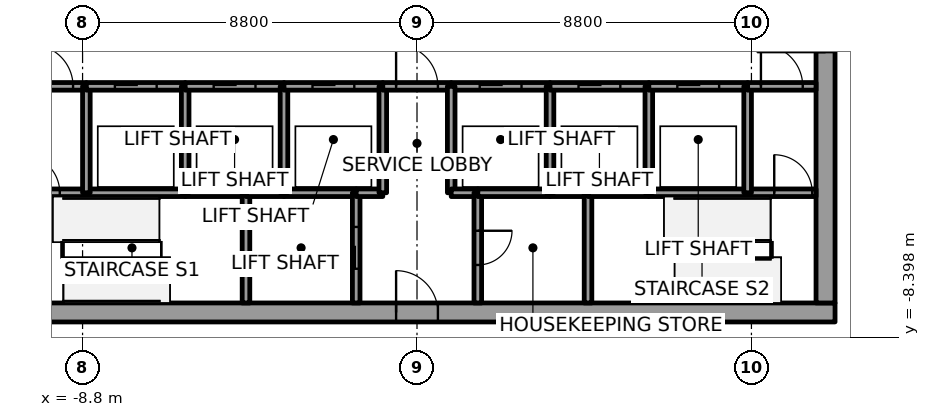
"""IFC4 building model, lengths in metres.
Left out: names, types, materials, properties, quantities, classifications, styles, units other than length and angle.
Written with IfcOpenShell. Run it as: python <this file> out.ifc"""

import sys

from ifc_helpers import new_model, si_unit, direction, frame, frame_2d, origin, place, context, subcontext, project, spatial, rectangle, extrude, element, fill, save


model = new_model("IFC4")
c1 = context("Model", 3, precision=1e-05, world=origin(), true_north=direction((0.0, 1.0)))
c2 = subcontext(c1, "Body", "Model", "MODEL_VIEW")
j1 = project(units=[si_unit("LENGTHUNIT", "METRE"), si_unit("PLANEANGLEUNIT", "RADIAN")], contexts=[c1])
p1 = place(None, origin())
s1 = spatial("IfcSite", under=j1, at=p1, CompositionType="ELEMENT")
p2 = place(p1, origin())
s2 = spatial("IfcBuilding", under=s1, at=p2, CompositionType="ELEMENT")
p3 = place(p2, frame((0.0, 0.0, 40.8)))
s3 = spatial("IfcBuildingStorey", under=s2, at=p3, CompositionType="ELEMENT", Elevation=40.8)
p4 = place(p3, frame((-11.0, -7.75, 0.0), z_axis=(0.0, 0.0, 1.0), x_axis=(1.0, 0.0, 0.0)))
e1 = element("IfcWall", 1, at=p4, inside=s3, PredefinedType="SHEAR", context=c2, shape_type="SweptSolid", body=[
    extrude(rectangle(XDim=22.0, YDim=0.5, at=frame_2d((11.0, 0.0))), origin(), (0.0, 0.0, 1.0), 7.2),
])
p5 = place(p4, frame((10.45, 0.0, 0.0)))
e2 = element("IfcOpeningElement", 2, at=p5, cuts=e1, PredefinedType="OPENING", context=c2, shape_type="SweptSolid", body=[
    extrude(rectangle(XDim=1.1, YDim=2.1, at=frame_2d((0.55, 1.05))), frame((0.0, 0.25, 0.0), z_axis=(0.0, -1.0, 0.0), x_axis=(1.0, 0.0, 0.0)), (0.0, 0.0, 1.0), 0.5),
])
p6 = place(p3, frame((10.75, -7.5, 0.0), z_axis=(0.0, 0.0, 1.0), x_axis=(0.0, 1.0, 0.0)))
e3 = element("IfcWall", 3, at=p6, inside=s3, PredefinedType="SHEAR", context=c2, shape_type="SweptSolid", body=[
    extrude(rectangle(XDim=15.0, YDim=0.5, at=frame_2d((7.5, 0.0))), origin(), (0.0, 0.0, 1.0), 7.2),
])
p7 = place(p6, frame((6.6, 0.0, 0.0)))
e4 = element("IfcOpeningElement", 4, at=p7, cuts=e3, PredefinedType="OPENING", context=c2, shape_type="SweptSolid", body=[
    extrude(rectangle(XDim=1.8, YDim=2.1, at=frame_2d((0.9, 1.05))), frame((0.0, 0.25, 0.0), z_axis=(0.0, -1.0, 0.0), x_axis=(1.0, 0.0, 0.0)), (0.0, 0.0, 1.0), 0.5),
])
p8 = place(p3, frame((-10.5, -4.6, 0.0), z_axis=(0.0, 0.0, 1.0), x_axis=(1.0, 0.0, 0.0)))
e5 = element("IfcWall", 5, at=p8, inside=s3, PredefinedType="SOLIDWALL", context=c2, shape_type="SweptSolid", body=[
    extrude(rectangle(XDim=1.8, YDim=0.2, at=frame_2d((0.9, 0.0))), origin(), (0.0, 0.0, 1.0), 7.05),
])
p9 = place(p8, frame((0.1, 0.0, 0.0)))
e6 = element("IfcOpeningElement", 6, at=p9, cuts=e5, PredefinedType="OPENING", context=c2, shape_type="SweptSolid", body=[
    extrude(rectangle(XDim=1.0, YDim=2.1, at=frame_2d((0.5, 1.05))), frame((0.0, 0.1, 0.0), z_axis=(0.0, -1.0, 0.0), x_axis=(1.0, 0.0, 0.0)), (0.0, 0.0, 1.0), 0.2),
])
p10 = place(p3, frame((-10.5, -1.8, 0.0), z_axis=(0.0, 0.0, 1.0), x_axis=(1.0, 0.0, 0.0)))
e7 = element("IfcWall", 7, at=p10, inside=s3, PredefinedType="SOLIDWALL", context=c2, shape_type="SweptSolid", body=[
    extrude(rectangle(XDim=1.8, YDim=0.2, at=frame_2d((0.9, 0.0))), origin(), (0.0, 0.0, 1.0), 7.05),
])
p11 = place(p10, frame((0.35, 0.0, 0.0)))
e8 = element("IfcOpeningElement", 8, at=p11, cuts=e7, PredefinedType="OPENING", context=c2, shape_type="SweptSolid", body=[
    extrude(rectangle(XDim=1.1, YDim=2.1, at=frame_2d((0.55, 1.05))), frame((0.0, 0.1, 0.0), z_axis=(0.0, -1.0, 0.0), x_axis=(1.0, 0.0, 0.0)), (0.0, 0.0, 1.0), 0.2),
])
p12 = place(p3, frame((-8.7, -4.6, 0.0), z_axis=(0.0, 0.0, 1.0), x_axis=(1.0, 0.0, 0.0)))
e9 = element("IfcWall", 9, at=p12, inside=s3, PredefinedType="SOLIDWALL", context=c2, shape_type="SweptSolid", body=[
    extrude(rectangle(XDim=2.6, YDim=0.2, at=frame_2d((1.3, 0.0))), origin(), (0.0, 0.0, 1.0), 7.05),
])
p13 = place(p3, frame((-8.7, -4.6, 0.0), z_axis=(0.0, 0.0, 1.0), x_axis=(0.0, 1.0, 0.0)))
e10 = element("IfcWall", 10, at=p13, inside=s3, PredefinedType="SOLIDWALL", context=c2, shape_type="SweptSolid", body=[
    extrude(rectangle(XDim=2.8, YDim=0.2, at=frame_2d((1.4, 0.0))), origin(), (0.0, 0.0, 1.0), 7.05),
])
p14 = place(p3, frame((-8.7, -1.8, 0.0), z_axis=(0.0, 0.0, 1.0), x_axis=(1.0, 0.0, 0.0)))
e11 = element("IfcWall", 11, at=p14, inside=s3, PredefinedType="SOLIDWALL", context=c2, shape_type="SweptSolid", body=[
    extrude(rectangle(XDim=2.6, YDim=0.2, at=frame_2d((1.3, 0.0))), origin(), (0.0, 0.0, 1.0), 7.05),
])
p15 = place(p14, frame((0.75, 0.0, 0.0)))
e12 = element("IfcOpeningElement", 12, at=p15, cuts=e11, PredefinedType="OPENING", context=c2, shape_type="SweptSolid", body=[
    extrude(rectangle(XDim=1.1, YDim=2.1, at=frame_2d((0.55, 1.05))), frame((0.0, 0.1, 0.0), z_axis=(0.0, -1.0, 0.0), x_axis=(1.0, 0.0, 0.0)), (0.0, 0.0, 1.0), 0.2),
])
p16 = place(p3, frame((-6.1, -4.6, 0.0), z_axis=(0.0, 0.0, 1.0), x_axis=(1.0, 0.0, 0.0)))
e13 = element("IfcWall", 13, at=p16, inside=s3, PredefinedType="SOLIDWALL", context=c2, shape_type="SweptSolid", body=[
    extrude(rectangle(XDim=1.6, YDim=0.2, at=frame_2d((0.8, 0.0))), origin(), (0.0, 0.0, 1.0), 7.05),
])
p17 = place(p3, frame((-6.1, -4.6, 0.0), z_axis=(0.0, 0.0, 1.0), x_axis=(0.0, 1.0, 0.0)))
e14 = element("IfcWall", 14, at=p17, inside=s3, PredefinedType="SOLIDWALL", context=c2, shape_type="SweptSolid", body=[
    extrude(rectangle(XDim=2.8, YDim=0.2, at=frame_2d((1.4, 0.0))), origin(), (0.0, 0.0, 1.0), 7.05),
])
p18 = place(p3, frame((-6.1, -1.8, 0.0), z_axis=(0.0, 0.0, 1.0), x_axis=(1.0, 0.0, 0.0)))
e15 = element("IfcWall", 15, at=p18, inside=s3, PredefinedType="SOLIDWALL", context=c2, shape_type="SweptSolid", body=[
    extrude(rectangle(XDim=2.6, YDim=0.2, at=frame_2d((1.3, 0.0))), origin(), (0.0, 0.0, 1.0), 7.05),
])
p19 = place(p18, frame((0.75, 0.0, 0.0)))
e16 = element("IfcOpeningElement", 16, at=p19, cuts=e15, PredefinedType="OPENING", context=c2, shape_type="SweptSolid", body=[
    extrude(rectangle(XDim=1.1, YDim=2.1, at=frame_2d((0.55, 1.05))), frame((0.0, 0.1, 0.0), z_axis=(0.0, -1.0, 0.0), x_axis=(1.0, 0.0, 0.0)), (0.0, 0.0, 1.0), 0.2),
])
p20 = place(p3, frame((-4.5, -4.6, 0.0), z_axis=(0.0, 0.0, 1.0), x_axis=(0.0, -1.0, 0.0)))
e17 = element("IfcWall", 17, at=p20, inside=s3, PredefinedType="SOLIDWALL", context=c2, shape_type="SweptSolid", body=[
    extrude(rectangle(XDim=2.9, YDim=0.2, at=frame_2d((1.45, 0.0))), origin(), (0.0, 0.0, 1.0), 7.05),
])
p21 = place(p3, frame((-4.5, -4.6, 0.0), z_axis=(0.0, 0.0, 1.0), x_axis=(1.0, 0.0, 0.0)))
e18 = element("IfcWall", 18, at=p21, inside=s3, PredefinedType="SOLIDWALL", context=c2, shape_type="SweptSolid", body=[
    extrude(rectangle(XDim=1.0, YDim=0.2, at=frame_2d((0.5, 0.0))), origin(), (0.0, 0.0, 1.0), 7.05),
])
p22 = place(p3, frame((-3.5, -4.6, 0.0), z_axis=(0.0, 0.0, 1.0), x_axis=(1.0, 0.0, 0.0)))
e19 = element("IfcWall", 19, at=p22, inside=s3, PredefinedType="SOLIDWALL", context=c2, shape_type="SweptSolid", body=[
    extrude(rectangle(XDim=1.9, YDim=0.2, at=frame_2d((0.95, 0.0))), origin(), (0.0, 0.0, 1.0), 7.05),
])
p23 = place(p3, frame((-3.5, -4.6, 0.0), z_axis=(0.0, 0.0, 1.0), x_axis=(0.0, 1.0, 0.0)))
e20 = element("IfcWall", 20, at=p23, inside=s3, PredefinedType="SOLIDWALL", context=c2, shape_type="SweptSolid", body=[
    extrude(rectangle(XDim=2.8, YDim=0.2, at=frame_2d((1.4, 0.0))), origin(), (0.0, 0.0, 1.0), 7.05),
])
p24 = place(p3, frame((-3.5, -1.8, 0.0), z_axis=(0.0, 0.0, 1.0), x_axis=(1.0, 0.0, 0.0)))
e21 = element("IfcWall", 21, at=p24, inside=s3, PredefinedType="SOLIDWALL", context=c2, shape_type="SweptSolid", body=[
    extrude(rectangle(XDim=2.6, YDim=0.2, at=frame_2d((1.3, 0.0))), origin(), (0.0, 0.0, 1.0), 7.05),
])
p25 = place(p24, frame((0.75, 0.0, 0.0)))
e22 = element("IfcOpeningElement", 22, at=p25, cuts=e21, PredefinedType="OPENING", context=c2, shape_type="SweptSolid", body=[
    extrude(rectangle(XDim=1.1, YDim=2.1, at=frame_2d((0.55, 1.05))), frame((0.0, 0.1, 0.0), z_axis=(0.0, -1.0, 0.0), x_axis=(1.0, 0.0, 0.0)), (0.0, 0.0, 1.0), 0.2),
])
p26 = place(p3, frame((-1.6, -7.5, 0.0), z_axis=(0.0, 0.0, 1.0), x_axis=(0.0, 1.0, 0.0)))
e23 = element("IfcWall", 23, at=p26, inside=s3, PredefinedType="SOLIDWALL", context=c2, shape_type="SweptSolid", body=[
    extrude(rectangle(XDim=2.9, YDim=0.2, at=frame_2d((1.45, 0.0))), origin(), (0.0, 0.0, 1.0), 7.05),
])
p27 = place(p26, frame((0.9, 0.0, 0.0)))
e24 = element("IfcOpeningElement", 24, at=p27, cuts=e23, PredefinedType="OPENING", context=c2, shape_type="SweptSolid", body=[
    extrude(rectangle(XDim=1.1, YDim=2.1, at=frame_2d((0.55, 1.05))), frame((0.0, 0.1, 0.0), z_axis=(0.0, -1.0, 0.0), x_axis=(1.0, 0.0, 0.0)), (0.0, 0.0, 1.0), 0.2),
])
p28 = place(p3, frame((-1.6, -4.6, 0.0), z_axis=(0.0, 0.0, 1.0), x_axis=(1.0, 0.0, 0.0)))
e25 = element("IfcWall", 25, at=p28, inside=s3, PredefinedType="SOLIDWALL", context=c2, shape_type="SweptSolid", body=[
    extrude(rectangle(XDim=0.7, YDim=0.2, at=frame_2d((0.35, 0.0))), origin(), (0.0, 0.0, 1.0), 7.05),
])
p29 = place(p3, frame((-0.9, -4.6, 0.0), z_axis=(0.0, 0.0, 1.0), x_axis=(0.0, 1.0, 0.0)))
e26 = element("IfcWall", 26, at=p29, inside=s3, PredefinedType="SOLIDWALL", context=c2, shape_type="SweptSolid", body=[
    extrude(rectangle(XDim=2.8, YDim=0.2, at=frame_2d((1.4, 0.0))), origin(), (0.0, 0.0, 1.0), 7.05),
])
p30 = place(p3, frame((-0.9, -1.8, 0.0), z_axis=(0.0, 0.0, 1.0), x_axis=(1.0, 0.0, 0.0)))
e27 = element("IfcWall", 27, at=p30, inside=s3, PredefinedType="SOLIDWALL", context=c2, shape_type="SweptSolid", body=[
    extrude(rectangle(XDim=1.8, YDim=0.2, at=frame_2d((0.9, 0.0))), origin(), (0.0, 0.0, 1.0), 7.05),
])
p31 = place(p30, frame((0.35, 0.0, 0.0)))
e28 = element("IfcOpeningElement", 28, at=p31, cuts=e27, PredefinedType="OPENING", context=c2, shape_type="SweptSolid", body=[
    extrude(rectangle(XDim=1.1, YDim=2.1, at=frame_2d((0.55, 1.05))), frame((0.0, 0.1, 0.0), z_axis=(0.0, -1.0, 0.0), x_axis=(1.0, 0.0, 0.0)), (0.0, 0.0, 1.0), 0.2),
])
p32 = place(p3, frame((0.9, -1.8, 0.0), z_axis=(0.0, 0.0, 1.0), x_axis=(1.0, 0.0, 0.0)))
e29 = element("IfcWall", 29, at=p32, inside=s3, PredefinedType="SOLIDWALL", context=c2, shape_type="SweptSolid", body=[
    extrude(rectangle(XDim=2.6, YDim=0.2, at=frame_2d((1.3, 0.0))), origin(), (0.0, 0.0, 1.0), 7.05),
])
p33 = place(p32, frame((0.75, 0.0, 0.0)))
e30 = element("IfcOpeningElement", 30, at=p33, cuts=e29, PredefinedType="OPENING", context=c2, shape_type="SweptSolid", body=[
    extrude(rectangle(XDim=1.1, YDim=2.1, at=frame_2d((0.55, 1.05))), frame((0.0, 0.1, 0.0), z_axis=(0.0, -1.0, 0.0), x_axis=(1.0, 0.0, 0.0)), (0.0, 0.0, 1.0), 0.2),
])
p34 = place(p3, frame((0.9, -1.8, 0.0), z_axis=(0.0, 0.0, 1.0), x_axis=(0.0, -1.0, 0.0)))
e31 = element("IfcWall", 31, at=p34, inside=s3, PredefinedType="SOLIDWALL", context=c2, shape_type="SweptSolid", body=[
    extrude(rectangle(XDim=2.8, YDim=0.2, at=frame_2d((1.4, 0.0))), origin(), (0.0, 0.0, 1.0), 7.05),
])
p35 = place(p3, frame((0.9, -4.6, 0.0), z_axis=(0.0, 0.0, 1.0), x_axis=(1.0, 0.0, 0.0)))
e32 = element("IfcWall", 32, at=p35, inside=s3, PredefinedType="SOLIDWALL", context=c2, shape_type="SweptSolid", body=[
    extrude(rectangle(XDim=0.7, YDim=0.2, at=frame_2d((0.35, 0.0))), origin(), (0.0, 0.0, 1.0), 7.05),
])
p36 = place(p3, frame((1.6, -4.6, 0.0), z_axis=(0.0, 0.0, 1.0), x_axis=(0.0, -1.0, 0.0)))
e33 = element("IfcWall", 33, at=p36, inside=s3, PredefinedType="SOLIDWALL", context=c2, shape_type="SweptSolid", body=[
    extrude(rectangle(XDim=2.9, YDim=0.2, at=frame_2d((1.45, 0.0))), origin(), (0.0, 0.0, 1.0), 7.05),
])
p37 = place(p36, frame((1.0, 0.0, 0.0)))
e34 = element("IfcOpeningElement", 34, at=p37, cuts=e33, PredefinedType="OPENING", context=c2, shape_type="SweptSolid", body=[
    extrude(rectangle(XDim=0.9, YDim=2.1, at=frame_2d((0.45, 1.05))), frame((0.0, 0.1, 0.0), z_axis=(0.0, -1.0, 0.0), x_axis=(1.0, 0.0, 0.0)), (0.0, 0.0, 1.0), 0.2),
])
p38 = place(p3, frame((3.5, -4.6, 0.0), z_axis=(0.0, 0.0, 1.0), x_axis=(-1.0, 0.0, 0.0)))
e35 = element("IfcWall", 35, at=p38, inside=s3, PredefinedType="SOLIDWALL", context=c2, shape_type="SweptSolid", body=[
    extrude(rectangle(XDim=1.9, YDim=0.2, at=frame_2d((0.95, 0.0))), origin(), (0.0, 0.0, 1.0), 7.05),
])
p39 = place(p3, frame((4.5, -4.6, 0.0), z_axis=(0.0, 0.0, 1.0), x_axis=(-1.0, 0.0, 0.0)))
e36 = element("IfcWall", 36, at=p39, inside=s3, PredefinedType="SOLIDWALL", context=c2, shape_type="SweptSolid", body=[
    extrude(rectangle(XDim=1.0, YDim=0.2, at=frame_2d((0.5, 0.0))), origin(), (0.0, 0.0, 1.0), 7.05),
])
p40 = place(p3, frame((3.5, -4.6, 0.0), z_axis=(0.0, 0.0, 1.0), x_axis=(0.0, 1.0, 0.0)))
e37 = element("IfcWall", 37, at=p40, inside=s3, PredefinedType="SOLIDWALL", context=c2, shape_type="SweptSolid", body=[
    extrude(rectangle(XDim=2.8, YDim=0.2, at=frame_2d((1.4, 0.0))), origin(), (0.0, 0.0, 1.0), 7.05),
])
p41 = place(p3, frame((3.5, -1.8, 0.0), z_axis=(0.0, 0.0, 1.0), x_axis=(1.0, 0.0, 0.0)))
e38 = element("IfcWall", 38, at=p41, inside=s3, PredefinedType="SOLIDWALL", context=c2, shape_type="SweptSolid", body=[
    extrude(rectangle(XDim=2.6, YDim=0.2, at=frame_2d((1.3, 0.0))), origin(), (0.0, 0.0, 1.0), 7.05),
])
p42 = place(p41, frame((0.75, 0.0, 0.0)))
e39 = element("IfcOpeningElement", 39, at=p42, cuts=e38, PredefinedType="OPENING", context=c2, shape_type="SweptSolid", body=[
    extrude(rectangle(XDim=1.1, YDim=2.1, at=frame_2d((0.55, 1.05))), frame((0.0, 0.1, 0.0), z_axis=(0.0, -1.0, 0.0), x_axis=(1.0, 0.0, 0.0)), (0.0, 0.0, 1.0), 0.2),
])
p43 = place(p3, frame((4.5, -7.5, 0.0), z_axis=(0.0, 0.0, 1.0), x_axis=(0.0, 1.0, 0.0)))
e40 = element("IfcWall", 40, at=p43, inside=s3, PredefinedType="SOLIDWALL", context=c2, shape_type="SweptSolid", body=[
    extrude(rectangle(XDim=2.9, YDim=0.2, at=frame_2d((1.45, 0.0))), origin(), (0.0, 0.0, 1.0), 7.05),
])
p44 = place(p3, frame((4.5, -4.6, 0.0), z_axis=(0.0, 0.0, 1.0), x_axis=(1.0, 0.0, 0.0)))
e41 = element("IfcWall", 41, at=p44, inside=s3, PredefinedType="SOLIDWALL", context=c2, shape_type="SweptSolid", body=[
    extrude(rectangle(XDim=1.6, YDim=0.2, at=frame_2d((0.8, 0.0))), origin(), (0.0, 0.0, 1.0), 7.05),
])
p45 = place(p3, frame((6.1, -4.6, 0.0), z_axis=(0.0, 0.0, 1.0), x_axis=(1.0, 0.0, 0.0)))
e42 = element("IfcWall", 42, at=p45, inside=s3, PredefinedType="SOLIDWALL", context=c2, shape_type="SweptSolid", body=[
    extrude(rectangle(XDim=2.6, YDim=0.2, at=frame_2d((1.3, 0.0))), origin(), (0.0, 0.0, 1.0), 7.05),
])
p46 = place(p3, frame((6.1, -4.6, 0.0), z_axis=(0.0, 0.0, 1.0), x_axis=(0.0, 1.0, 0.0)))
e43 = element("IfcWall", 43, at=p46, inside=s3, PredefinedType="SOLIDWALL", context=c2, shape_type="SweptSolid", body=[
    extrude(rectangle(XDim=2.8, YDim=0.2, at=frame_2d((1.4, 0.0))), origin(), (0.0, 0.0, 1.0), 7.05),
])
p47 = place(p3, frame((6.1, -1.8, 0.0), z_axis=(0.0, 0.0, 1.0), x_axis=(1.0, 0.0, 0.0)))
e44 = element("IfcWall", 44, at=p47, inside=s3, PredefinedType="SOLIDWALL", context=c2, shape_type="SweptSolid", body=[
    extrude(rectangle(XDim=2.6, YDim=0.2, at=frame_2d((1.3, 0.0))), origin(), (0.0, 0.0, 1.0), 7.05),
])
p48 = place(p47, frame((0.75, 0.0, 0.0)))
e45 = element("IfcOpeningElement", 45, at=p48, cuts=e44, PredefinedType="OPENING", context=c2, shape_type="SweptSolid", body=[
    extrude(rectangle(XDim=1.1, YDim=2.1, at=frame_2d((0.55, 1.05))), frame((0.0, 0.1, 0.0), z_axis=(0.0, -1.0, 0.0), x_axis=(1.0, 0.0, 0.0)), (0.0, 0.0, 1.0), 0.2),
])
p49 = place(p3, frame((8.7, -4.6, 0.0), z_axis=(0.0, 0.0, 1.0), x_axis=(1.0, 0.0, 0.0)))
e46 = element("IfcWall", 46, at=p49, inside=s3, PredefinedType="SOLIDWALL", context=c2, shape_type="SweptSolid", body=[
    extrude(rectangle(XDim=1.8, YDim=0.2, at=frame_2d((0.9, 0.0))), origin(), (0.0, 0.0, 1.0), 7.05),
])
p50 = place(p49, frame((0.7, 0.0, 0.0)))
e47 = element("IfcOpeningElement", 47, at=p50, cuts=e46, PredefinedType="OPENING", context=c2, shape_type="SweptSolid", body=[
    extrude(rectangle(XDim=1.0, YDim=2.1, at=frame_2d((0.5, 1.05))), frame((0.0, 0.1, 0.0), z_axis=(0.0, -1.0, 0.0), x_axis=(1.0, 0.0, 0.0)), (0.0, 0.0, 1.0), 0.2),
])
p51 = place(p3, frame((8.7, -1.8, 0.0), z_axis=(0.0, 0.0, 1.0), x_axis=(0.0, -1.0, 0.0)))
e48 = element("IfcWall", 48, at=p51, inside=s3, PredefinedType="SOLIDWALL", context=c2, shape_type="SweptSolid", body=[
    extrude(rectangle(XDim=2.8, YDim=0.2, at=frame_2d((1.4, 0.0))), origin(), (0.0, 0.0, 1.0), 7.05),
])
p52 = place(p3, frame((8.7, -1.8, 0.0), z_axis=(0.0, 0.0, 1.0), x_axis=(1.0, 0.0, 0.0)))
e49 = element("IfcWall", 49, at=p52, inside=s3, PredefinedType="SOLIDWALL", context=c2, shape_type="SweptSolid", body=[
    extrude(rectangle(XDim=1.8, YDim=0.2, at=frame_2d((0.9, 0.0))), origin(), (0.0, 0.0, 1.0), 7.05),
])
p53 = place(p52, frame((0.35, 0.0, 0.0)))
e50 = element("IfcOpeningElement", 50, at=p53, cuts=e49, PredefinedType="OPENING", context=c2, shape_type="SweptSolid", body=[
    extrude(rectangle(XDim=1.1, YDim=2.1, at=frame_2d((0.55, 1.05))), frame((0.0, 0.1, 0.0), z_axis=(0.0, -1.0, 0.0), x_axis=(1.0, 0.0, 0.0)), (0.0, 0.0, 1.0), 0.2),
])
p54 = place(p15, origin())
e51 = element("IfcDoor", 51, at=p54, inside=s3, OperationType="SLIDING_TO_RIGHT", PredefinedType="DOOR", context=c2, shape_type="SweptSolid", body=[
    extrude(rectangle(XDim=1.1, YDim=2.1, at=frame_2d((0.55, 1.05))), frame((0.0, 0.025, 0.0), z_axis=(0.0, -1.0, 0.0), x_axis=(1.0, 0.0, 0.0)), (0.0, 0.0, 1.0), 0.05),
])
fill(e12, e51)
p55 = place(p19, origin())
e52 = element("IfcDoor", 52, at=p55, inside=s3, OperationType="SLIDING_TO_LEFT", PredefinedType="DOOR", context=c2, shape_type="SweptSolid", body=[
    extrude(rectangle(XDim=1.1, YDim=2.1, at=frame_2d((0.55, 1.05))), frame((0.0, 0.025, 0.0), z_axis=(0.0, -1.0, 0.0), x_axis=(1.0, 0.0, 0.0)), (0.0, 0.0, 1.0), 0.05),
])
fill(e16, e52)
p56 = place(p25, origin())
e53 = element("IfcDoor", 53, at=p56, inside=s3, OperationType="SLIDING_TO_LEFT", PredefinedType="DOOR", context=c2, shape_type="SweptSolid", body=[
    extrude(rectangle(XDim=1.1, YDim=2.1, at=frame_2d((0.55, 1.05))), frame((0.0, 0.025, 0.0), z_axis=(0.0, -1.0, 0.0), x_axis=(1.0, 0.0, 0.0)), (0.0, 0.0, 1.0), 0.05),
])
fill(e22, e53)
p57 = place(p33, origin())
e54 = element("IfcDoor", 54, at=p57, inside=s3, OperationType="SLIDING_TO_LEFT", PredefinedType="DOOR", context=c2, shape_type="SweptSolid", body=[
    extrude(rectangle(XDim=1.1, YDim=2.1, at=frame_2d((0.55, 1.05))), frame((0.0, 0.025, 0.0), z_axis=(0.0, -1.0, 0.0), x_axis=(1.0, 0.0, 0.0)), (0.0, 0.0, 1.0), 0.05),
])
fill(e30, e54)
p58 = place(p42, origin())
e55 = element("IfcDoor", 55, at=p58, inside=s3, OperationType="SLIDING_TO_LEFT", PredefinedType="DOOR", context=c2, shape_type="SweptSolid", body=[
    extrude(rectangle(XDim=1.1, YDim=2.1, at=frame_2d((0.55, 1.05))), frame((0.0, 0.025, 0.0), z_axis=(0.0, -1.0, 0.0), x_axis=(1.0, 0.0, 0.0)), (0.0, 0.0, 1.0), 0.05),
])
fill(e39, e55)
p59 = place(p48, origin())
e56 = element("IfcDoor", 56, at=p59, inside=s3, OperationType="SLIDING_TO_LEFT", PredefinedType="DOOR", context=c2, shape_type="SweptSolid", body=[
    extrude(rectangle(XDim=1.1, YDim=2.1, at=frame_2d((0.55, 1.05))), frame((0.0, 0.025, 0.0), z_axis=(0.0, -1.0, 0.0), x_axis=(1.0, 0.0, 0.0)), (0.0, 0.0, 1.0), 0.05),
])
fill(e45, e56)
p60 = place(p27, origin())
e57 = element("IfcDoor", 57, at=p60, inside=s3, OperationType="SLIDING_TO_LEFT", PredefinedType="DOOR", context=c2, shape_type="SweptSolid", body=[
    extrude(rectangle(XDim=1.1, YDim=2.1, at=frame_2d((0.55, 1.05))), frame((0.0, 0.025, 0.0), z_axis=(0.0, -1.0, 0.0), x_axis=(1.0, 0.0, 0.0)), (0.0, 0.0, 1.0), 0.05),
])
fill(e24, e57)
p61 = place(p11, origin())
e58 = element("IfcDoor", 58, at=p61, inside=s3, OperationType="SINGLE_SWING_LEFT", PredefinedType="DOOR", context=c2, shape_type="SweptSolid", body=[
    extrude(rectangle(XDim=1.1, YDim=2.1, at=frame_2d((0.55, 1.05))), frame((0.0, 0.025, 0.0), z_axis=(0.0, -1.0, 0.0), x_axis=(1.0, 0.0, 0.0)), (0.0, 0.0, 1.0), 0.05),
])
fill(e8, e58)
p62 = place(p53, origin())
e59 = element("IfcDoor", 59, at=p62, inside=s3, OperationType="SINGLE_SWING_RIGHT", PredefinedType="DOOR", context=c2, shape_type="SweptSolid", body=[
    extrude(rectangle(XDim=1.1, YDim=2.1, at=frame_2d((0.55, 1.05))), frame((0.0, 0.025, 0.0), z_axis=(0.0, -1.0, 0.0), x_axis=(1.0, 0.0, 0.0)), (0.0, 0.0, 1.0), 0.05),
])
fill(e50, e59)
p63 = place(p31, origin())
e60 = element("IfcDoor", 60, at=p63, inside=s3, OperationType="SINGLE_SWING_RIGHT", PredefinedType="DOOR", context=c2, shape_type="SweptSolid", body=[
    extrude(rectangle(XDim=1.1, YDim=2.1, at=frame_2d((0.55, 1.05))), frame((0.0, 0.025, 0.0), z_axis=(0.0, -1.0, 0.0), x_axis=(1.0, 0.0, 0.0)), (0.0, 0.0, 1.0), 0.05),
])
fill(e28, e60)
p64 = place(p9, origin())
e61 = element("IfcDoor", 61, at=p64, inside=s3, OperationType="SINGLE_SWING_LEFT", PredefinedType="DOOR", context=c2, shape_type="SweptSolid", body=[
    extrude(rectangle(XDim=1.0, YDim=2.1, at=frame_2d((0.5, 1.05))), frame((0.0, 0.025, 0.0), z_axis=(0.0, -1.0, 0.0), x_axis=(1.0, 0.0, 0.0)), (0.0, 0.0, 1.0), 0.05),
])
fill(e6, e61)
p65 = place(p50, origin())
e62 = element("IfcDoor", 62, at=p65, inside=s3, OperationType="SINGLE_SWING_RIGHT", PredefinedType="DOOR", context=c2, shape_type="SweptSolid", body=[
    extrude(rectangle(XDim=1.0, YDim=2.1, at=frame_2d((0.5, 1.05))), frame((0.0, 0.025, 0.0), z_axis=(0.0, -1.0, 0.0), x_axis=(1.0, 0.0, 0.0)), (0.0, 0.0, 1.0), 0.05),
])
fill(e47, e62)
p66 = place(p37, origin())
e63 = element("IfcDoor", 63, at=p66, inside=s3, OperationType="SINGLE_SWING_RIGHT", PredefinedType="DOOR", context=c2, shape_type="SweptSolid", body=[
    extrude(rectangle(XDim=0.9, YDim=2.1, at=frame_2d((0.45, 1.05))), frame((0.0, 0.025, 0.0), z_axis=(0.0, -1.0, 0.0), x_axis=(1.0, 0.0, 0.0)), (0.0, 0.0, 1.0), 0.05),
])
fill(e34, e63)
p67 = place(p7, origin())
e64 = element("IfcDoor", 64, at=p67, inside=s3, OperationType="DOUBLE_DOOR_SINGLE_SWING", PredefinedType="DOOR", context=c2, shape_type="SweptSolid", body=[
    extrude(rectangle(XDim=1.8, YDim=2.1, at=frame_2d((0.9, 1.05))), frame((0.0, 0.025, 0.0), z_axis=(0.0, -1.0, 0.0), x_axis=(1.0, 0.0, 0.0)), (0.0, 0.0, 1.0), 0.05),
])
fill(e4, e64)
p68 = place(p5, origin())
e65 = element("IfcDoor", 65, at=p68, inside=s3, OperationType="SINGLE_SWING_RIGHT", PredefinedType="DOOR", context=c2, shape_type="SweptSolid", body=[
    extrude(rectangle(XDim=1.1, YDim=2.1, at=frame_2d((0.55, 1.05))), frame((0.0, 0.025, 0.0), z_axis=(0.0, -1.0, 0.0), x_axis=(1.0, 0.0, 0.0)), (0.0, 0.0, 1.0), 0.05),
])
fill(e2, e65)
save(model, sys.argv[1])
